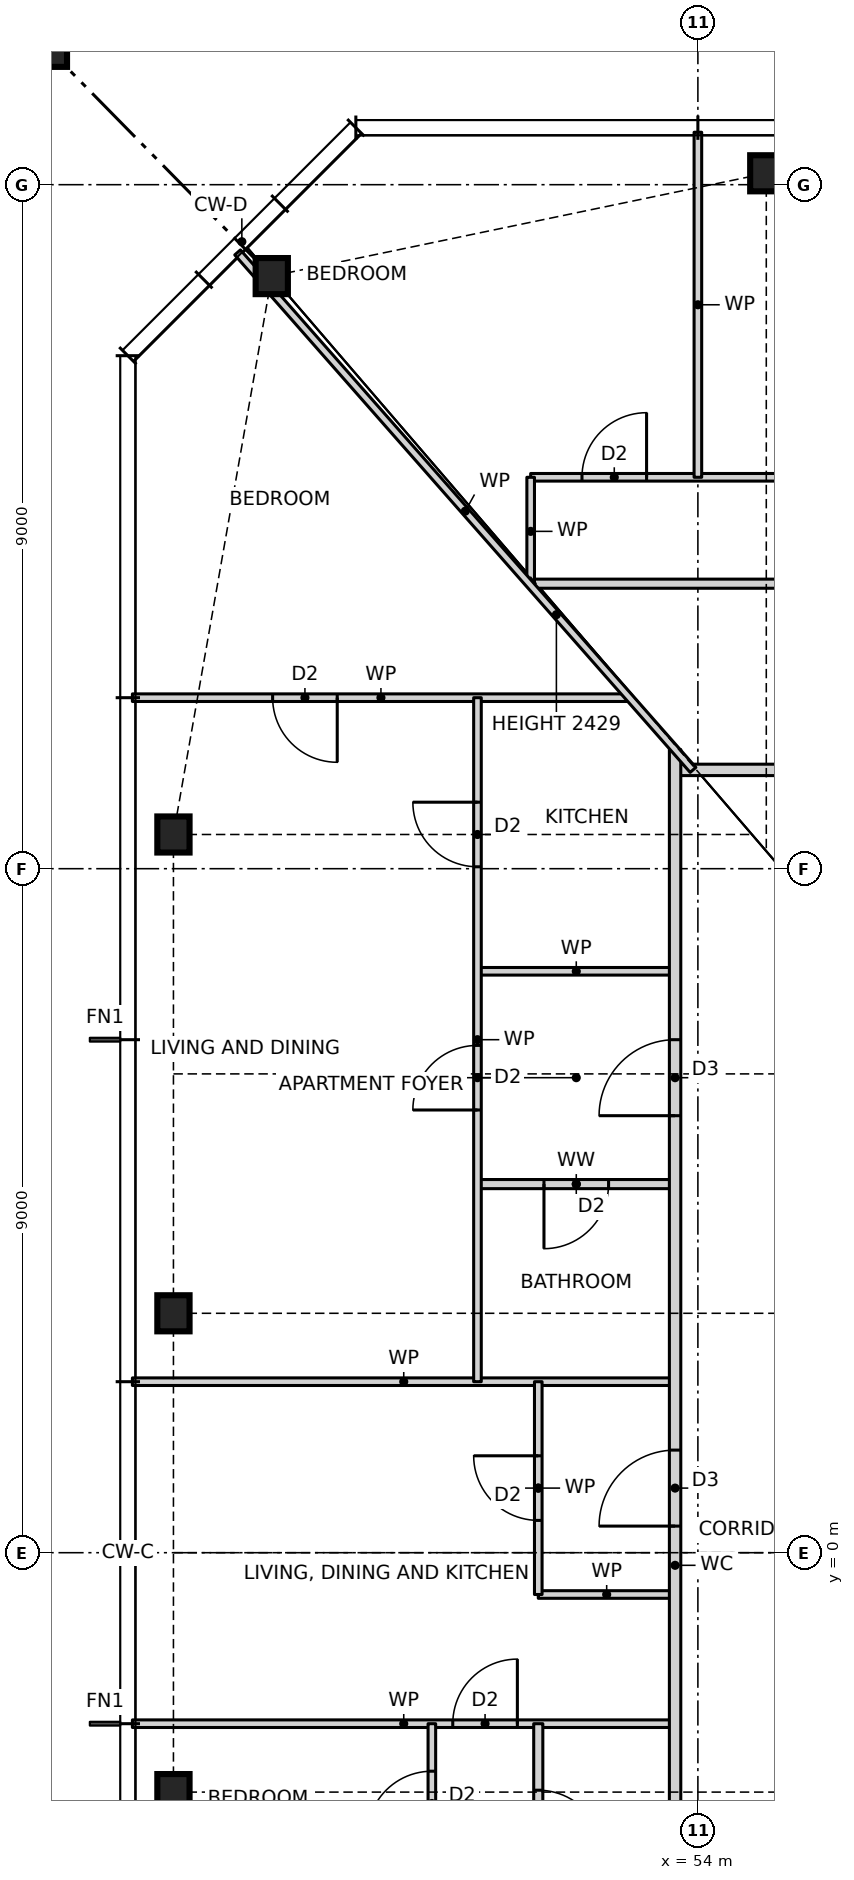
"""IFC4 building model, lengths in metres.
Left out: names, types, materials, properties, quantities, classifications, styles, units other than length and angle.
Written with IfcOpenShell. Run it as: python <this file> out.ifc"""

import sys

from ifc_helpers import new_model, si_unit, direction, frame, frame_2d, origin, origin_2d, place, context, subcontext, project, spatial, rectangle, hollow_rectangle, i_section, extrude, element, fill, save


model = new_model("IFC4")
c1 = context("Model", 3, precision=1e-05, world=origin(), true_north=direction((0.0, 1.0)))
c2 = subcontext(c1, "Body", "Model", "MODEL_VIEW")
j1 = project(units=[si_unit("LENGTHUNIT", "METRE"), si_unit("PLANEANGLEUNIT", "RADIAN")], contexts=[c1])
p1 = place(None, origin())
s1 = spatial("IfcSite", under=j1, at=p1, CompositionType="ELEMENT")
p2 = place(p1, origin())
s2 = spatial("IfcBuilding", under=s1, at=p2, CompositionType="ELEMENT")
p3 = place(p2, frame((0.0, 0.0, 60.5)))
s3 = spatial("IfcBuildingStorey", under=s2, at=p3, CompositionType="ELEMENT", Elevation=60.5)
for number, where, z_axis, x_axis in (
    (1, (54.9, 18.15, 0.0), (0.0, 0.0, 1.0), (1.0, 0.0, 0.0)),
    (2, (48.394, 16.797, 0.0), (0.0, 0.0, 1.0), (1.0, 0.0, 0.0)),
    (3, (47.1, 9.45, 0.0), (0.0, 0.0, 1.0), (1.0, 0.0, 0.0)),
    (4, (47.1, 3.15, 0.0), (0.0, 0.0, 1.0), (1.0, 0.0, 0.0)),
    (5, (47.1, -3.15, 0.0), (0.0, 0.0, 1.0), (1.0, 0.0, 0.0)),
):
    element("IfcColumn", number, at=place(p3, frame(where, z_axis=z_axis, x_axis=x_axis)), inside=s3, PredefinedType="COLUMN", context=c2, shape_type="SweptSolid", body=[
        extrude(i_section(OverallWidth=0.424, OverallDepth=0.475, WebThickness=0.048, FlangeThickness=0.077, at=origin_2d()), origin(), (0.0, 0.0, 1.0), 3.5),
    ])
p4 = place(p3, frame((45.1, 20.15, 0.0), z_axis=(0.0, 0.0, 1.0), x_axis=(1.0, 0.0, 0.0)))
e6 = element("IfcColumn", 6, at=p4, inside=s3, PredefinedType="COLUMN", context=c2, shape_type="SweptSolid", body=[
    extrude(hollow_rectangle(XDim=1.2, YDim=1.2, WallThickness=0.07, at=origin_2d()), origin(), (0.0, 0.0, 1.0), 3.5),
])
p5 = place(p3, frame((46.56, -2.25, 0.0), z_axis=(0.0, 0.0, 1.0), x_axis=(1.0, 0.0, 0.0)))
e7 = element("IfcWall", 7, at=p5, inside=s3, PredefinedType="PARTITIONING", context=c2, shape_type="SweptSolid", body=[
    extrude(rectangle(XDim=7.14, YDim=0.1, at=frame_2d((3.57, 0.0))), origin(), (0.0, 0.0, 1.0), 3.27),
])
p6 = place(p5, frame((4.215, 0.0, 0.0)))
e8 = element("IfcOpeningElement", 8, at=p6, cuts=e7, PredefinedType="OPENING", context=c2, shape_type="SweptSolid", body=[
    extrude(rectangle(XDim=0.85, YDim=2.1, at=frame_2d((0.425, 1.05))), frame((0.0, 0.06, 0.0), z_axis=(0.0, -1.0, 0.0), x_axis=(1.0, 0.0, 0.0)), (0.0, 0.0, 1.0), 0.12),
])
p7 = place(p3, frame((51.9, -0.55, 0.0), z_axis=(0.0, 0.0, 1.0), x_axis=(1.0, 0.0, 0.0)))
e9 = element("IfcWall", 9, at=p7, inside=s3, PredefinedType="PARTITIONING", context=c2, shape_type="SweptSolid", body=[
    extrude(rectangle(XDim=1.8, YDim=0.1, at=frame_2d((0.9, 0.0))), origin(), (0.0, 0.0, 1.0), 3.27),
])
p8 = place(p3, frame((46.56, 2.25, 0.0), z_axis=(0.0, 0.0, 1.0), x_axis=(1.0, 0.0, 0.0)))
e10 = element("IfcWall", 10, at=p8, inside=s3, PredefinedType="PARTITIONING", context=c2, shape_type="SweptSolid", body=[
    extrude(rectangle(XDim=7.14, YDim=0.1, at=frame_2d((3.57, 0.0))), origin(), (0.0, 0.0, 1.0), 3.27),
])
p9 = place(p3, frame((51.1, 4.85, 0.0), z_axis=(0.0, 0.0, 1.0), x_axis=(1.0, 0.0, 0.0)))
e11 = element("IfcWall", 11, at=p9, inside=s3, PredefinedType="PARTITIONING", context=c2, shape_type="SweptSolid", body=[
    extrude(rectangle(XDim=2.6, YDim=0.12, at=frame_2d((1.3, 0.0))), origin(), (0.0, 0.0, 1.0), 3.27),
])
p10 = place(p9, frame((0.875, 0.0, 0.0)))
e12 = element("IfcOpeningElement", 12, at=p10, cuts=e11, PredefinedType="OPENING", context=c2, shape_type="SweptSolid", body=[
    extrude(rectangle(XDim=0.85, YDim=2.1, at=frame_2d((0.425, 1.05))), frame((0.0, 0.07, 0.0), z_axis=(0.0, -1.0, 0.0), x_axis=(1.0, 0.0, 0.0)), (0.0, 0.0, 1.0), 0.14),
])
p11 = place(p3, frame((51.1, 7.65, 0.0), z_axis=(0.0, 0.0, 1.0), x_axis=(1.0, 0.0, 0.0)))
e13 = element("IfcWall", 13, at=p11, inside=s3, PredefinedType="PARTITIONING", context=c2, shape_type="SweptSolid", body=[
    extrude(rectangle(XDim=2.6, YDim=0.1, at=frame_2d((1.3, 0.0))), origin(), (0.0, 0.0, 1.0), 3.27),
])
p12 = place(p3, frame((53.7, 10.3, 0.0), z_axis=(0.0, 0.0, 1.0), x_axis=(1.0, 0.0, 0.0)))
e14 = element("IfcWall", 14, at=p12, inside=s3, PredefinedType="PARTITIONING", context=c2, shape_type="SweptSolid", body=[
    extrude(rectangle(XDim=18.6, YDim=0.15, at=frame_2d((9.3, 0.0))), origin(), (0.0, 0.0, 1.0), 3.27),
])
p13 = place(p12, frame((12.8, 0.0, 0.0)))
e15 = element("IfcOpeningElement", 15, at=p13, cuts=e14, PredefinedType="OPENING", context=c2, shape_type="SweptSolid", body=[
    extrude(rectangle(XDim=1.0, YDim=2.1, at=frame_2d((0.5, 1.05))), frame((0.0, 0.085, 0.0), z_axis=(0.0, -1.0, 0.0), x_axis=(1.0, 0.0, 0.0)), (0.0, 0.0, 1.0), 0.17),
])
p14 = place(p3, frame((46.56, 11.25, 0.0), z_axis=(0.0, 0.0, 1.0), x_axis=(1.0, 0.0, 0.0)))
e16 = element("IfcWall", 16, at=p14, inside=s3, PredefinedType="PARTITIONING", context=c2, shape_type="SweptSolid", body=[
    extrude(rectangle(XDim=6.54, YDim=0.1, at=frame_2d((3.27, 0.0))), origin(), (0.0, 0.0, 1.0), 3.27),
])
p15 = place(p14, frame((1.845, 0.0, 0.0)))
e17 = element("IfcOpeningElement", 17, at=p15, cuts=e16, PredefinedType="OPENING", context=c2, shape_type="SweptSolid", body=[
    extrude(rectangle(XDim=0.85, YDim=2.1, at=frame_2d((0.425, 1.05))), frame((0.0, 0.06, 0.0), z_axis=(0.0, -1.0, 0.0), x_axis=(1.0, 0.0, 0.0)), (0.0, 0.0, 1.0), 0.12),
])
p16 = place(p3, frame((51.8, 12.75, 0.0), z_axis=(0.0, 0.0, 1.0), x_axis=(1.0, 0.0, 0.0)))
e18 = element("IfcWall", 18, at=p16, inside=s3, PredefinedType="PARTITIONING", context=c2, shape_type="SweptSolid", body=[
    extrude(rectangle(XDim=20.2, YDim=0.12, at=frame_2d((10.1, 0.0))), origin(), (0.0, 0.0, 1.0), 3.27),
])
p17 = place(p16, frame((17.975, 0.0, 0.0)))
e19 = element("IfcOpeningElement", 19, at=p17, cuts=e18, PredefinedType="OPENING", context=c2, shape_type="SweptSolid", body=[
    extrude(rectangle(XDim=0.85, YDim=2.1, at=frame_2d((0.425, 1.05))), frame((0.0, 0.07, 0.0), z_axis=(0.0, -1.0, 0.0), x_axis=(1.0, 0.0, 0.0)), (0.0, 0.0, 1.0), 0.14),
])
p18 = place(p16, frame((14.775, 0.0, 0.0)))
e20 = element("IfcOpeningElement", 20, at=p18, cuts=e18, PredefinedType="OPENING", context=c2, shape_type="SweptSolid", body=[
    extrude(rectangle(XDim=0.85, YDim=2.1, at=frame_2d((0.425, 1.05))), frame((0.0, 0.07, 0.0), z_axis=(0.0, -1.0, 0.0), x_axis=(1.0, 0.0, 0.0)), (0.0, 0.0, 1.0), 0.14),
])
p19 = place(p16, frame((9.125, 0.0, 0.0)))
e21 = element("IfcOpeningElement", 21, at=p19, cuts=e18, PredefinedType="OPENING", context=c2, shape_type="SweptSolid", body=[
    extrude(rectangle(XDim=0.85, YDim=2.1, at=frame_2d((0.425, 1.05))), frame((0.0, 0.07, 0.0), z_axis=(0.0, -1.0, 0.0), x_axis=(1.0, 0.0, 0.0)), (0.0, 0.0, 1.0), 0.14),
])
p20 = place(p16, frame((3.525, 0.0, 0.0)))
e22 = element("IfcOpeningElement", 22, at=p20, cuts=e18, PredefinedType="OPENING", context=c2, shape_type="SweptSolid", body=[
    extrude(rectangle(XDim=0.85, YDim=2.1, at=frame_2d((0.425, 1.05))), frame((0.0, 0.07, 0.0), z_axis=(0.0, -1.0, 0.0), x_axis=(1.0, 0.0, 0.0)), (0.0, 0.0, 1.0), 0.14),
])
p21 = place(p3, frame((51.8, 14.15, 0.0), z_axis=(0.0, 0.0, 1.0), x_axis=(1.0, 0.0, 0.0)))
e23 = element("IfcWall", 23, at=p21, inside=s3, PredefinedType="PARTITIONING", context=c2, shape_type="SweptSolid", body=[
    extrude(rectangle(XDim=11.2, YDim=0.1, at=frame_2d((5.6, 0.0))), origin(), (0.0, 0.0, 1.0), 3.27),
])
p22 = place(p21, frame((8.525, 0.0, 0.0)))
e24 = element("IfcOpeningElement", 24, at=p22, cuts=e23, PredefinedType="OPENING", context=c2, shape_type="SweptSolid", body=[
    extrude(rectangle(XDim=0.85, YDim=2.1, at=frame_2d((0.425, 1.05))), frame((0.0, 0.06, 0.0), z_axis=(0.0, -1.0, 0.0), x_axis=(1.0, 0.0, 0.0)), (0.0, 0.0, 1.0), 0.12),
])
p23 = place(p21, frame((4.025, 0.0, 0.0)))
e25 = element("IfcOpeningElement", 25, at=p23, cuts=e23, PredefinedType="OPENING", context=c2, shape_type="SweptSolid", body=[
    extrude(rectangle(XDim=0.85, YDim=2.1, at=frame_2d((0.425, 1.05))), frame((0.0, 0.06, 0.0), z_axis=(0.0, -1.0, 0.0), x_axis=(1.0, 0.0, 0.0)), (0.0, 0.0, 1.0), 0.12),
])
p24 = place(p21, frame((0.675, 0.0, 0.0)))
e26 = element("IfcOpeningElement", 26, at=p24, cuts=e23, PredefinedType="OPENING", context=c2, shape_type="SweptSolid", body=[
    extrude(rectangle(XDim=0.85, YDim=2.1, at=frame_2d((0.425, 1.05))), frame((0.0, 0.06, 0.0), z_axis=(0.0, -1.0, 0.0), x_axis=(1.0, 0.0, 0.0)), (0.0, 0.0, 1.0), 0.12),
])
p25 = place(p3, frame((54.0, 14.15, 0.0), z_axis=(0.0, 0.0, 1.0), x_axis=(0.0, 1.0, 0.0)))
e27 = element("IfcWall", 27, at=p25, inside=s3, PredefinedType="PARTITIONING", context=c2, shape_type="SweptSolid", body=[
    extrude(rectangle(XDim=4.54, YDim=0.1, at=frame_2d((2.27, 0.0))), origin(), (0.0, 0.0, 1.0), 3.27),
])
p26 = place(p3, frame((53.7, -10.9, 0.0), z_axis=(0.0, 0.0, 1.0), x_axis=(0.0, 1.0, 0.0)))
e28 = element("IfcWall", 28, at=p26, inside=s3, PredefinedType="PARTITIONING", context=c2, shape_type="SweptSolid", body=[
    extrude(rectangle(XDim=21.468, YDim=0.15, at=frame_2d((10.734, 0.0))), origin(), (0.0, 0.0, 1.0), 3.27),
])
p27 = place(p26, frame((16.65, 0.0, 0.0)))
e29 = element("IfcOpeningElement", 29, at=p27, cuts=e28, PredefinedType="OPENING", context=c2, shape_type="SweptSolid", body=[
    extrude(rectangle(XDim=1.0, YDim=2.1, at=frame_2d((0.5, 1.05))), frame((0.0, 0.085, 0.0), z_axis=(0.0, -1.0, 0.0), x_axis=(1.0, 0.0, 0.0)), (0.0, 0.0, 1.0), 0.17),
])
p28 = place(p26, frame((11.25, 0.0, 0.0)))
e30 = element("IfcOpeningElement", 30, at=p28, cuts=e28, PredefinedType="OPENING", context=c2, shape_type="SweptSolid", body=[
    extrude(rectangle(XDim=1.0, YDim=2.1, at=frame_2d((0.5, 1.05))), frame((0.0, 0.085, 0.0), z_axis=(0.0, -1.0, 0.0), x_axis=(1.0, 0.0, 0.0)), (0.0, 0.0, 1.0), 0.17),
])
p29 = place(p3, frame((51.9, -12.614, 0.0), z_axis=(0.0, 0.0, 1.0), x_axis=(0.0, 1.0, 0.0)))
e31 = element("IfcWall", 31, at=p29, inside=s3, PredefinedType="PARTITIONING", context=c2, shape_type="SweptSolid", body=[
    extrude(rectangle(XDim=10.364, YDim=0.12, at=frame_2d((5.182, 0.0))), origin(), (0.0, 0.0, 1.0), 3.27),
])
p30 = place(p29, frame((8.639, 0.0, 0.0)))
e32 = element("IfcOpeningElement", 32, at=p30, cuts=e31, PredefinedType="OPENING", context=c2, shape_type="SweptSolid", body=[
    extrude(rectangle(XDim=0.85, YDim=2.1, at=frame_2d((0.425, 1.05))), frame((0.0, 0.07, 0.0), z_axis=(0.0, -1.0, 0.0), x_axis=(1.0, 0.0, 0.0)), (0.0, 0.0, 1.0), 0.14),
])
p31 = place(p29, frame((5.139, 0.0, 0.0)))
e33 = element("IfcOpeningElement", 33, at=p31, cuts=e31, PredefinedType="OPENING", context=c2, shape_type="SweptSolid", body=[
    extrude(rectangle(XDim=0.85, YDim=2.1, at=frame_2d((0.425, 1.05))), frame((0.0, 0.07, 0.0), z_axis=(0.0, -1.0, 0.0), x_axis=(1.0, 0.0, 0.0)), (0.0, 0.0, 1.0), 0.14),
])
p32 = place(p29, frame((1.257, 0.0, 0.0)))
e34 = element("IfcOpeningElement", 34, at=p32, cuts=e31, PredefinedType="OPENING", context=c2, shape_type="SweptSolid", body=[
    extrude(rectangle(XDim=0.85, YDim=2.1, at=frame_2d((0.425, 1.05))), frame((0.0, 0.07, 0.0), z_axis=(0.0, -1.0, 0.0), x_axis=(1.0, 0.0, 0.0)), (0.0, 0.0, 1.0), 0.14),
])
p33 = place(p3, frame((51.9, -0.55, 0.0), z_axis=(0.0, 0.0, 1.0), x_axis=(0.0, 1.0, 0.0)))
e35 = element("IfcWall", 35, at=p33, inside=s3, PredefinedType="PARTITIONING", context=c2, shape_type="SweptSolid", body=[
    extrude(rectangle(XDim=2.8, YDim=0.1, at=frame_2d((1.4, 0.0))), origin(), (0.0, 0.0, 1.0), 3.27),
])
p34 = place(p33, frame((0.975, 0.0, 0.0)))
e36 = element("IfcOpeningElement", 36, at=p34, cuts=e35, PredefinedType="OPENING", context=c2, shape_type="SweptSolid", body=[
    extrude(rectangle(XDim=0.85, YDim=2.1, at=frame_2d((0.425, 1.05))), frame((0.0, 0.06, 0.0), z_axis=(0.0, -1.0, 0.0), x_axis=(1.0, 0.0, 0.0)), (0.0, 0.0, 1.0), 0.12),
])
p35 = place(p3, frame((51.8, 12.727, 0.0), z_axis=(0.0, 0.0, 1.0), x_axis=(0.0, 1.0, 0.0)))
e37 = element("IfcWall", 37, at=p35, inside=s3, PredefinedType="PARTITIONING", context=c2, shape_type="SweptSolid", body=[
    extrude(rectangle(XDim=1.423, YDim=0.1, at=frame_2d((0.711, 0.0))), origin(), (0.0, 0.0, 1.0), 3.27),
])
p36 = place(p3, frame((51.1, 2.25, 0.0), z_axis=(0.0, 0.0, 1.0), x_axis=(0.0, 1.0, 0.0)))
e38 = element("IfcWall", 38, at=p36, inside=s3, PredefinedType="PARTITIONING", context=c2, shape_type="SweptSolid", body=[
    extrude(rectangle(XDim=9.0, YDim=0.1, at=frame_2d((4.5, 0.0))), origin(), (0.0, 0.0, 1.0), 3.27),
])
p37 = place(p36, frame((6.775, 0.0, 0.0)))
e39 = element("IfcOpeningElement", 39, at=p37, cuts=e38, PredefinedType="OPENING", context=c2, shape_type="SweptSolid", body=[
    extrude(rectangle(XDim=0.85, YDim=2.1, at=frame_2d((0.425, 1.05))), frame((0.0, 0.06, 0.0), z_axis=(0.0, -1.0, 0.0), x_axis=(1.0, 0.0, 0.0)), (0.0, 0.0, 1.0), 0.12),
])
p38 = place(p36, frame((3.575, 0.0, 0.0)))
e40 = element("IfcOpeningElement", 40, at=p38, cuts=e38, PredefinedType="OPENING", context=c2, shape_type="SweptSolid", body=[
    extrude(rectangle(XDim=0.85, YDim=2.1, at=frame_2d((0.425, 1.05))), frame((0.0, 0.06, 0.0), z_axis=(0.0, -1.0, 0.0), x_axis=(1.0, 0.0, 0.0)), (0.0, 0.0, 1.0), 0.12),
])
p39 = place(p3, frame((50.5, -13.45, 0.0), z_axis=(0.0, 0.0, 1.0), x_axis=(0.0, 1.0, 0.0)))
e41 = element("IfcWall", 41, at=p39, inside=s3, PredefinedType="PARTITIONING", context=c2, shape_type="SweptSolid", body=[
    extrude(rectangle(XDim=11.2, YDim=0.1, at=frame_2d((5.6, 0.0))), origin(), (0.0, 0.0, 1.0), 3.27),
])
p40 = place(p39, frame((9.725, 0.0, 0.0)))
e42 = element("IfcOpeningElement", 42, at=p40, cuts=e41, PredefinedType="OPENING", context=c2, shape_type="SweptSolid", body=[
    extrude(rectangle(XDim=0.85, YDim=2.1, at=frame_2d((0.425, 1.05))), frame((0.0, 0.06, 0.0), z_axis=(0.0, -1.0, 0.0), x_axis=(1.0, 0.0, 0.0)), (0.0, 0.0, 1.0), 0.12),
])
p41 = place(p39, frame((4.025, 0.0, 0.0)))
e43 = element("IfcOpeningElement", 43, at=p41, cuts=e41, PredefinedType="OPENING", context=c2, shape_type="SweptSolid", body=[
    extrude(rectangle(XDim=0.85, YDim=2.1, at=frame_2d((0.425, 1.05))), frame((0.0, 0.06, 0.0), z_axis=(0.0, -1.0, 0.0), x_axis=(1.0, 0.0, 0.0)), (0.0, 0.0, 1.0), 0.12),
])
p42 = place(p39, frame((0.675, 0.0, 0.0)))
e44 = element("IfcOpeningElement", 44, at=p42, cuts=e41, PredefinedType="OPENING", context=c2, shape_type="SweptSolid", body=[
    extrude(rectangle(XDim=0.85, YDim=2.1, at=frame_2d((0.425, 1.05))), frame((0.0, 0.06, 0.0), z_axis=(0.0, -1.0, 0.0), x_axis=(1.0, 0.0, 0.0)), (0.0, 0.0, 1.0), 0.12),
])
p43 = place(p3, frame((53.936, 10.3, 0.0), z_axis=(0.0, 0.0, 1.0), x_axis=(-0.660638210404, 0.750704439146, 0.0)))
e45 = element("IfcWall", 45, at=p43, inside=s3, PredefinedType="PARTITIONING", context=c2, shape_type="SweptSolid", body=[
    extrude(rectangle(XDim=9.07, YDim=0.1, at=frame_2d((4.535, 0.0))), origin(), (0.0, 0.0, 1.0), 2.429),
])
p44 = place(p24, origin())
e46 = element("IfcDoor", 46, at=p44, inside=s3, OperationType="SINGLE_SWING_RIGHT", PredefinedType="DOOR", context=c2, shape_type="SweptSolid", body=[
    extrude(rectangle(XDim=0.85, YDim=2.1, at=frame_2d((0.425, 1.05))), frame((0.0, 0.025, 0.0), z_axis=(0.0, -1.0, 0.0), x_axis=(1.0, 0.0, 0.0)), (0.0, 0.0, 1.0), 0.05),
])
fill(e26, e46)
p45 = place(p37, origin())
e47 = element("IfcDoor", 47, at=p45, inside=s3, OperationType="SINGLE_SWING_RIGHT", PredefinedType="DOOR", context=c2, shape_type="SweptSolid", body=[
    extrude(rectangle(XDim=0.85, YDim=2.1, at=frame_2d((0.425, 1.05))), frame((0.0, 0.025, 0.0), z_axis=(0.0, -1.0, 0.0), x_axis=(1.0, 0.0, 0.0)), (0.0, 0.0, 1.0), 0.05),
])
fill(e39, e47)
p46 = place(p27, origin())
e48 = element("IfcDoor", 48, at=p46, inside=s3, OperationType="SINGLE_SWING_LEFT", PredefinedType="DOOR", context=c2, shape_type="SweptSolid", body=[
    extrude(rectangle(XDim=1.0, YDim=2.1, at=frame_2d((0.5, 1.05))), frame((0.0, 0.025, 0.0), z_axis=(0.0, -1.0, 0.0), x_axis=(1.0, 0.0, 0.0)), (0.0, 0.0, 1.0), 0.05),
])
fill(e29, e48)
p47 = place(p38, origin())
e49 = element("IfcDoor", 49, at=p47, inside=s3, OperationType="SINGLE_SWING_LEFT", PredefinedType="DOOR", context=c2, shape_type="SweptSolid", body=[
    extrude(rectangle(XDim=0.85, YDim=2.1, at=frame_2d((0.425, 1.05))), frame((0.0, 0.025, 0.0), z_axis=(0.0, -1.0, 0.0), x_axis=(1.0, 0.0, 0.0)), (0.0, 0.0, 1.0), 0.05),
])
fill(e40, e49)
p48 = place(p10, frame((0.85, 0.0, 0.0), z_axis=(0.0, 0.0, 1.0), x_axis=(-1.0, 0.0, 0.0)))
e50 = element("IfcDoor", 50, at=p48, inside=s3, OperationType="SINGLE_SWING_RIGHT", PredefinedType="DOOR", context=c2, shape_type="SweptSolid", body=[
    extrude(rectangle(XDim=0.85, YDim=2.1, at=frame_2d((0.425, 1.05))), frame((0.0, 0.025, 0.0), z_axis=(0.0, -1.0, 0.0), x_axis=(1.0, 0.0, 0.0)), (0.0, 0.0, 1.0), 0.05),
])
fill(e12, e50)
p49 = place(p15, frame((0.85, 0.0, 0.0), z_axis=(0.0, 0.0, 1.0), x_axis=(-1.0, 0.0, 0.0)))
e51 = element("IfcDoor", 51, at=p49, inside=s3, OperationType="SINGLE_SWING_LEFT", PredefinedType="DOOR", context=c2, shape_type="SweptSolid", body=[
    extrude(rectangle(XDim=0.85, YDim=2.1, at=frame_2d((0.425, 1.05))), frame((0.0, 0.025, 0.0), z_axis=(0.0, -1.0, 0.0), x_axis=(1.0, 0.0, 0.0)), (0.0, 0.0, 1.0), 0.05),
])
fill(e17, e51)
p50 = place(p28, origin())
e52 = element("IfcDoor", 52, at=p50, inside=s3, OperationType="SINGLE_SWING_LEFT", PredefinedType="DOOR", context=c2, shape_type="SweptSolid", body=[
    extrude(rectangle(XDim=1.0, YDim=2.1, at=frame_2d((0.5, 1.05))), frame((0.0, 0.025, 0.0), z_axis=(0.0, -1.0, 0.0), x_axis=(1.0, 0.0, 0.0)), (0.0, 0.0, 1.0), 0.05),
])
fill(e30, e52)
p51 = place(p34, origin())
e53 = element("IfcDoor", 53, at=p51, inside=s3, OperationType="SINGLE_SWING_RIGHT", PredefinedType="DOOR", context=c2, shape_type="SweptSolid", body=[
    extrude(rectangle(XDim=0.85, YDim=2.1, at=frame_2d((0.425, 1.05))), frame((0.0, 0.025, 0.0), z_axis=(0.0, -1.0, 0.0), x_axis=(1.0, 0.0, 0.0)), (0.0, 0.0, 1.0), 0.05),
])
fill(e36, e53)
p52 = place(p6, origin())
e54 = element("IfcDoor", 54, at=p52, inside=s3, OperationType="SINGLE_SWING_RIGHT", PredefinedType="DOOR", context=c2, shape_type="SweptSolid", body=[
    extrude(rectangle(XDim=0.85, YDim=2.1, at=frame_2d((0.425, 1.05))), frame((0.0, 0.025, 0.0), z_axis=(0.0, -1.0, 0.0), x_axis=(1.0, 0.0, 0.0)), (0.0, 0.0, 1.0), 0.05),
])
fill(e8, e54)
p53 = place(p40, origin())
e55 = element("IfcDoor", 55, at=p53, inside=s3, OperationType="SINGLE_SWING_LEFT", PredefinedType="DOOR", context=c2, shape_type="SweptSolid", body=[
    extrude(rectangle(XDim=0.85, YDim=2.1, at=frame_2d((0.425, 1.05))), frame((0.0, 0.025, 0.0), z_axis=(0.0, -1.0, 0.0), x_axis=(1.0, 0.0, 0.0)), (0.0, 0.0, 1.0), 0.05),
])
fill(e42, e55)
p54 = place(p30, frame((0.85, 0.0, 0.0), z_axis=(0.0, 0.0, 1.0), x_axis=(-1.0, 0.0, 0.0)))
e56 = element("IfcDoor", 56, at=p54, inside=s3, OperationType="SINGLE_SWING_RIGHT", PredefinedType="DOOR", context=c2, shape_type="SweptSolid", body=[
    extrude(rectangle(XDim=0.85, YDim=2.1, at=frame_2d((0.425, 1.05))), frame((0.0, 0.025, 0.0), z_axis=(0.0, -1.0, 0.0), x_axis=(1.0, 0.0, 0.0)), (0.0, 0.0, 1.0), 0.05),
])
fill(e32, e56)
save(model, sys.argv[1])
